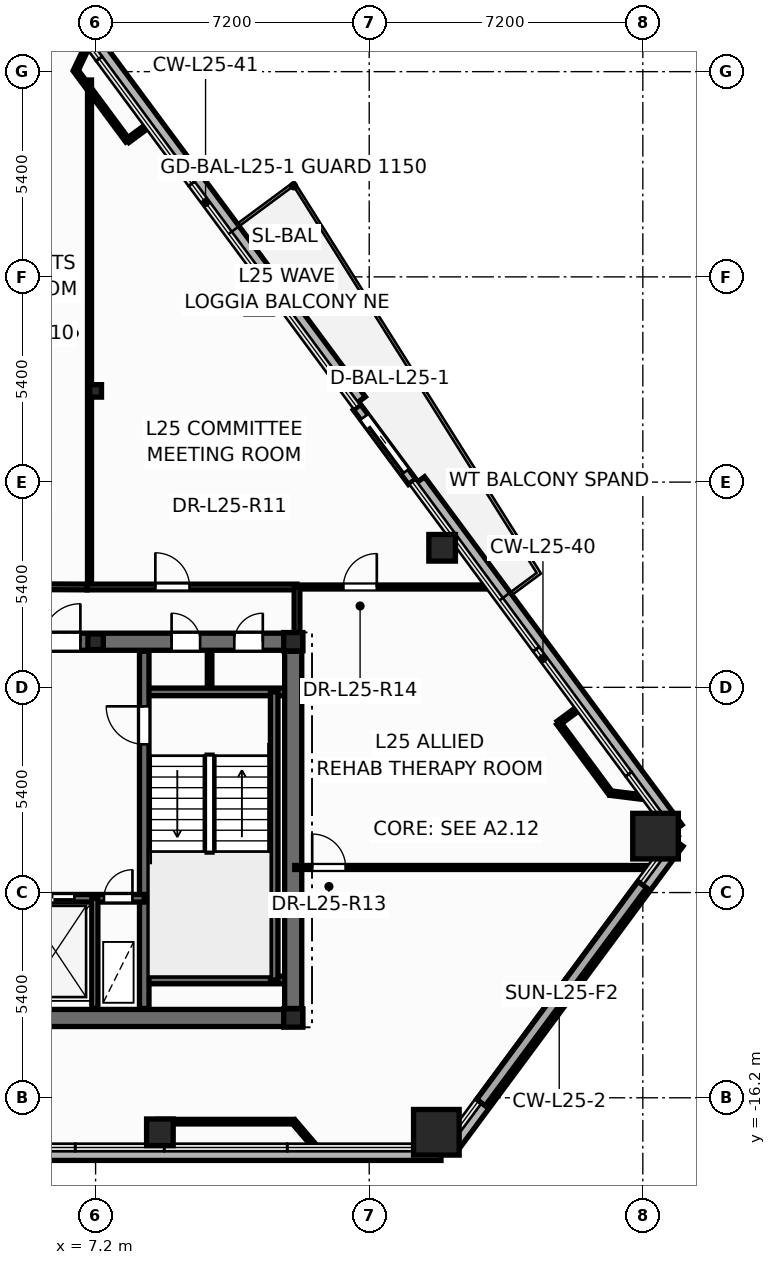
"""IFC4 building model, lengths in metres.
Left out: names, types, materials, properties, quantities, classifications, styles, units other than length and angle.
Written with IfcOpenShell. Run it as: python <this file> out.ifc"""

import sys

from ifc_helpers import new_model, si_unit, direction, frame, frame_2d, origin, origin_2d, place, context, subcontext, project, spatial, rectangle, hollow_rectangle, hollow_circle, i_section, extrude, element, fill, save


model = new_model("IFC4")
c1 = context("Model", 3, precision=1e-05, world=origin(), true_north=direction((0.0, 1.0)))
c2 = subcontext(c1, "Body", "Model", "MODEL_VIEW")
j1 = project(units=[si_unit("LENGTHUNIT", "METRE"), si_unit("PLANEANGLEUNIT", "RADIAN")], contexts=[c1])
p1 = place(None, origin())
s1 = spatial("IfcSite", under=j1, at=p1, CompositionType="ELEMENT")
p2 = place(p1, origin())
s2 = spatial("IfcBuilding", under=s1, at=p2, CompositionType="ELEMENT")
p3 = place(p2, frame((0.0, 0.0, 99.6)))
s3 = spatial("IfcBuildingStorey", under=s2, at=p3, CompositionType="ELEMENT", Elevation=99.6)
for number, where, z_axis, x_axis in (
    (1, (16.167, -17.108, 0.0), (0.0, 0.0, 1.0), (1.0, 0.0, 0.0)),
    (2, (21.934, -9.316, 0.0), (0.0, 0.0, 1.0), (1.0, 0.0, 0.0)),
):
    element("IfcColumn", number, at=place(p3, frame(where, z_axis=z_axis, x_axis=x_axis)), inside=s3, PredefinedType="COLUMN", context=c2, shape_type="SweptSolid", body=[
        extrude(hollow_rectangle(XDim=1.2, YDim=1.2, WallThickness=0.055, at=origin_2d()), origin(), (0.0, 0.0, 1.0), 3.6),
    ])
for number, where, z_axis, x_axis in (
    (3, (8.892, -17.108, 0.0), (0.0, 0.0, 1.0), (1.0, 0.0, 0.0)),
    (4, (16.319, -1.729, 0.0), (0.0, 0.0, 1.0), (1.0, 0.0, 0.0)),
    (5, (11.506, 4.775, 0.0), (0.0, 0.0, 1.0), (1.0, 0.0, 0.0)),
):
    element("IfcColumn", number, at=place(p3, frame(where, z_axis=z_axis, x_axis=x_axis)), inside=s3, PredefinedType="COLUMN", context=c2, shape_type="SweptSolid", body=[
        extrude(hollow_circle(Radius=0.35, WallThickness=0.03, at=origin_2d()), origin(), (0.0, 0.0, 1.0), 3.6),
    ])
for number, where, z_axis, x_axis in (
    (6, (12.4, -14.1, 0.0), (0.0, 0.0, 1.0), (1.0, 0.0, 0.0)),
    (7, (12.4, -4.2, 0.0), (0.0, 0.0, 1.0), (1.0, 0.0, 0.0)),
):
    element("IfcColumn", number, at=place(p3, frame(where, z_axis=z_axis, x_axis=x_axis)), inside=s3, PredefinedType="COLUMN", context=c2, shape_type="SweptSolid", body=[
        extrude(i_section(OverallWidth=0.5, OverallDepth=0.482, WebThickness=0.04, FlangeThickness=0.045, at=origin_2d()), origin(), (0.0, 0.0, 1.0), 3.6),
    ])
p4 = place(p3, frame((7.2, -4.2, 0.0), z_axis=(0.0, 0.0, 1.0), x_axis=(1.0, 0.0, 0.0)))
e8 = element("IfcColumn", 8, at=p4, inside=s3, PredefinedType="PILASTER", context=c2, shape_type="SweptSolid", body=[
    extrude(i_section(OverallWidth=0.405, OverallDepth=0.414, WebThickness=0.022, FlangeThickness=0.032, at=origin_2d()), origin(), (0.0, 0.0, 1.0), 3.6),
])
p5 = place(p3, frame((7.2, 2.4, 0.0), z_axis=(0.0, 0.0, 1.0), x_axis=(1.0, 0.0, 0.0)))
e9 = element("IfcColumn", 9, at=p5, inside=s3, PredefinedType="COLUMN", context=c2, shape_type="SweptSolid", body=[
    extrude(i_section(OverallWidth=0.311, OverallDepth=0.327, WebThickness=0.016, FlangeThickness=0.025, at=origin_2d()), origin(), (0.0, 0.0, 1.0), 3.6),
])
p6 = place(p3, frame((-16.289, -17.668, -0.2), z_axis=(0.0, 0.0, 1.0), x_axis=(1.0, 0.0, 0.0)))
e10 = element("IfcWall", 10, at=p6, inside=s3, PredefinedType="PARAPET", context=c2, shape_type="SweptSolid", body=[
    extrude(rectangle(XDim=32.577, YDim=0.36, at=frame_2d((16.289, 0.0))), origin(), (0.0, 0.0, 1.0), 0.38),
])
p7 = place(p3, frame((16.545, -17.539, -0.2), z_axis=(0.0, 0.0, 1.0), x_axis=(0.594898670943, 0.803800703726, 0.0)))
e11 = element("IfcWall", 11, at=p7, inside=s3, PredefinedType="PARAPET", context=c2, shape_type="SweptSolid", body=[
    extrude(rectangle(XDim=10.032, YDim=0.36, at=frame_2d((5.016, 0.0))), origin(), (0.0, 0.0, 1.0), 0.38),
])
p8 = place(p3, frame((22.489, -9.124, -0.2), z_axis=(0.0, 0.0, 1.0), x_axis=(-0.59490615029, 0.803795168154, 0.0)))
e12 = element("IfcWall", 12, at=p8, inside=s3, PredefinedType="PARAPET", context=c2, shape_type="SweptSolid", body=[
    extrude(rectangle(XDim=11.392, YDim=0.36, at=frame_2d((5.696, 0.0))), origin(), (0.0, 0.0, 1.0), 0.38),
])
p9 = place(p3, frame((14.153, 2.139, -0.2), z_axis=(0.0, 0.0, 1.0), x_axis=(-0.594915583051, 0.803788186678, 0.0)))
e13 = element("IfcWall", 13, at=p9, inside=s3, PredefinedType="PARAPET", context=c2, shape_type="SweptSolid", body=[
    extrude(rectangle(XDim=13.215, YDim=0.36, at=frame_2d((6.607, 0.0))), origin(), (0.0, 0.0, 1.0), 0.38),
])
p10 = place(p3, frame((15.53, 0.01, -0.015), z_axis=(0.0, 0.0, 1.0), x_axis=(-0.594897308784, 0.803801711868, 0.0)))
e14 = element("IfcWall", 14, at=p10, inside=s3, PredefinedType="STANDARD", context=c2, shape_type="SweptSolid", body=[
    extrude(rectangle(XDim=2.44, YDim=0.24, at=frame_2d((1.22, 0.0))), origin(), (0.0, 0.0, 1.0), 2.729),
])
p11 = place(p10, frame((0.32, 0.0, 0.015)))
e15 = element("IfcOpeningElement", 15, at=p11, cuts=e14, PredefinedType="OPENING", context=c2, shape_type="SweptSolid", body=[
    extrude(rectangle(XDim=1.806, YDim=2.204, at=frame_2d((0.9, 1.102))), frame((0.0, 0.13, 0.0), z_axis=(0.0, -1.0, 0.0), x_axis=(1.0, 0.0, 0.0)), (0.0, 0.0, 1.0), 0.26),
])
p12 = place(p3, frame((10.2, -5.52, 0.0), z_axis=(0.0, 0.0, 1.0), x_axis=(0.0, 1.0, 0.0)))
e16 = element("IfcWall", 16, at=p12, inside=s3, PredefinedType="PARTITIONING", context=c2, shape_type="SweptSolid", body=[
    extrude(rectangle(XDim=1.12, YDim=0.12, at=frame_2d((0.56, 0.0))), origin(), (0.0, 0.0, 1.0), 3.35),
])
p13 = place(p3, frame((-12.65, -14.1, 0.0), z_axis=(0.0, 0.0, 1.0), x_axis=(1.0, 0.0, 0.0)))
e17 = element("IfcWall", 17, at=p13, inside=s3, PredefinedType="SHEAR", context=c2, shape_type="SweptSolid", body=[
    extrude(rectangle(XDim=25.3, YDim=0.45, at=frame_2d((12.65, 0.0))), origin(), (0.0, 0.0, 1.0), 3.6),
])
p14 = place(p3, frame((-12.65, -4.2, 0.0), z_axis=(0.0, 0.0, 1.0), x_axis=(1.0, 0.0, 0.0)))
e18 = element("IfcWall", 18, at=p14, inside=s3, PredefinedType="SHEAR", context=c2, shape_type="SweptSolid", body=[
    extrude(rectangle(XDim=25.3, YDim=0.45, at=frame_2d((12.65, 0.0))), origin(), (0.0, 0.0, 1.0), 3.6),
])
p15 = place(p14, frame((1.85, 0.0, 0.0)))
e19 = element("IfcOpeningElement", 19, at=p15, cuts=e18, PredefinedType="OPENING", context=c2, shape_type="SweptSolid", body=[
    extrude(rectangle(XDim=0.756, YDim=2.054, at=frame_2d((0.375, 1.027))), frame((0.0, 0.235, 0.0), z_axis=(0.0, -1.0, 0.0), x_axis=(1.0, 0.0, 0.0)), (0.0, 0.0, 1.0), 0.47),
])
p16 = place(p14, frame((21.85, 0.0, 0.0)))
e20 = element("IfcOpeningElement", 20, at=p16, cuts=e18, PredefinedType="OPENING", context=c2, shape_type="SweptSolid", body=[
    extrude(rectangle(XDim=0.756, YDim=2.054, at=frame_2d((0.375, 1.027))), frame((0.0, 0.235, 0.0), z_axis=(0.0, -1.0, 0.0), x_axis=(1.0, 0.0, 0.0)), (0.0, 0.0, 1.0), 0.47),
])
p17 = place(p14, frame((23.5, 0.0, 0.0)))
e21 = element("IfcOpeningElement", 21, at=p17, cuts=e18, PredefinedType="OPENING", context=c2, shape_type="SweptSolid", body=[
    extrude(rectangle(XDim=0.756, YDim=2.054, at=frame_2d((0.375, 1.027))), frame((0.0, 0.235, 0.0), z_axis=(0.0, -1.0, 0.0), x_axis=(1.0, 0.0, 0.0)), (0.0, 0.0, 1.0), 0.47),
])
p18 = place(p14, frame((5.85, 0.0, 0.0)))
e22 = element("IfcOpeningElement", 22, at=p18, cuts=e18, PredefinedType="OPENING", context=c2, shape_type="SweptSolid", body=[
    extrude(rectangle(XDim=1.006, YDim=2.104, at=frame_2d((0.5, 1.052))), frame((0.0, 0.235, 0.0), z_axis=(0.0, -1.0, 0.0), x_axis=(1.0, 0.0, 0.0)), (0.0, 0.0, 1.0), 0.47),
])
p19 = place(p14, frame((10.35, 0.0, 0.0)))
e23 = element("IfcOpeningElement", 23, at=p19, cuts=e18, PredefinedType="OPENING", context=c2, shape_type="SweptSolid", body=[
    extrude(rectangle(XDim=1.406, YDim=2.154, at=frame_2d((0.7, 1.077))), frame((0.0, 0.235, 0.0), z_axis=(0.0, -1.0, 0.0), x_axis=(1.0, 0.0, 0.0)), (0.0, 0.0, 1.0), 0.47),
])
p20 = place(p14, frame((18.45, 0.0, 0.0)))
e24 = element("IfcOpeningElement", 24, at=p20, cuts=e18, PredefinedType="OPENING", context=c2, shape_type="SweptSolid", body=[
    extrude(rectangle(XDim=1.006, YDim=2.104, at=frame_2d((0.5, 1.052))), frame((0.0, 0.235, 0.0), z_axis=(0.0, -1.0, 0.0), x_axis=(1.0, 0.0, 0.0)), (0.0, 0.0, 1.0), 0.47),
])
for number, where, z_axis, x_axis in (
    (25, (8.48, -5.52, 0.0), (0.0, 0.0, 1.0), (1.0, 0.0, 0.0)),
    (26, (8.48, -13.1, 0.0), (0.0, 0.0, 1.0), (1.0, 0.0, 0.0)),
):
    element("IfcWall", number, at=place(p3, frame(where, z_axis=z_axis, x_axis=x_axis)), inside=s3, PredefinedType="SOLIDWALL", context=c2, shape_type="SweptSolid", body=[
        extrude(rectangle(XDim=3.87, YDim=0.2, at=frame_2d((1.935, 0.0))), origin(), (0.0, 0.0, 1.0), 3.6),
    ])
p21 = place(p3, frame((11.9, -13.1, 0.0), z_axis=(0.0, 0.0, 1.0), x_axis=(0.0, 1.0, 0.0)))
e27 = element("IfcWall", 27, at=p21, inside=s3, PredefinedType="SOLIDWALL", context=c2, shape_type="SweptSolid", body=[
    extrude(rectangle(XDim=7.58, YDim=0.2, at=frame_2d((3.79, 0.0))), origin(), (0.0, 0.0, 1.0), 3.6),
])
p22 = place(p3, frame((8.48, -13.85, 0.0), z_axis=(0.0, 0.0, 1.0), x_axis=(0.0, 1.0, 0.0)))
e28 = element("IfcWall", 28, at=p22, inside=s3, PredefinedType="SHEAR", context=c2, shape_type="SweptSolid", body=[
    extrude(rectangle(XDim=9.4, YDim=0.25, at=frame_2d((4.7, 0.0))), origin(), (0.0, 0.0, 1.0), 3.6),
])
p23 = place(p22, frame((6.95, 0.0, 0.0)))
e29 = element("IfcOpeningElement", 29, at=p23, cuts=e28, PredefinedType="OPENING", context=c2, shape_type="SweptSolid", body=[
    extrude(rectangle(XDim=1.006, YDim=2.104, at=frame_2d((0.5, 1.052))), frame((0.0, 0.135, 0.0), z_axis=(0.0, -1.0, 0.0), x_axis=(1.0, 0.0, 0.0)), (0.0, 0.0, 1.0), 0.27),
])
p24 = place(p3, frame((5.12, -10.95, 0.0), z_axis=(0.0, 0.0, 1.0), x_axis=(1.0, 0.0, 0.0)))
e30 = element("IfcWall", 30, at=p24, inside=s3, PredefinedType="SOLIDWALL", context=c2, shape_type="SweptSolid", body=[
    extrude(rectangle(XDim=3.36, YDim=0.2, at=frame_2d((1.68, 0.0))), origin(), (0.0, 0.0, 1.0), 3.6),
])
p25 = place(p24, frame((0.42, 0.0, 0.0)))
e31 = element("IfcOpeningElement", 31, at=p25, cuts=e30, PredefinedType="OPENING", context=c2, shape_type="SweptSolid", body=[
    extrude(rectangle(XDim=1.106, YDim=2.104, at=frame_2d((0.55, 1.052))), frame((0.0, 0.11, 0.0), z_axis=(0.0, -1.0, 0.0), x_axis=(1.0, 0.0, 0.0)), (0.0, 0.0, 1.0), 0.22),
])
p26 = place(p24, frame((2.3, 0.0, 0.0)))
e32 = element("IfcOpeningElement", 32, at=p26, cuts=e30, PredefinedType="OPENING", context=c2, shape_type="SweptSolid", body=[
    extrude(rectangle(XDim=0.756, YDim=2.054, at=frame_2d((0.375, 1.027))), frame((0.0, 0.11, 0.0), z_axis=(0.0, -1.0, 0.0), x_axis=(1.0, 0.0, 0.0)), (0.0, 0.0, 1.0), 0.22),
])
p27 = place(p3, frame((7.18, -13.85, 0.0), z_axis=(0.0, 0.0, 1.0), x_axis=(0.0, 1.0, 0.0)))
e33 = element("IfcWall", 33, at=p27, inside=s3, PredefinedType="PARTITIONING", context=c2, shape_type="SweptSolid", body=[
    extrude(rectangle(XDim=2.9, YDim=0.16, at=frame_2d((1.45, 0.0))), origin(), (0.0, 0.0, 1.0), 2.375),
])
p28 = place(p3, frame((12.4, -13.85, 0.0), z_axis=(0.0, 0.0, 1.0), x_axis=(0.0, 1.0, 0.0)))
e34 = element("IfcWall", 34, at=p28, inside=s3, PredefinedType="SHEAR", context=c2, shape_type="SweptSolid", body=[
    extrude(rectangle(XDim=9.4, YDim=0.45, at=frame_2d((4.7, 0.0))), origin(), (0.0, 0.0, 1.0), 3.6),
])
p29 = place(p3, frame((7.04, -2.76, 0.0), z_axis=(0.0, 0.0, 1.0), x_axis=(0.0, 1.0, 0.0)))
e35 = element("IfcWall", 35, at=p29, inside=s3, PredefinedType="PARTITIONING", context=c2, shape_type="SweptSolid", body=[
    extrude(rectangle(XDim=13.34, YDim=0.105, at=frame_2d((6.67, 0.0))), origin(), (0.0, 0.0, 1.0), 2.325),
])
p30 = place(p3, frame((12.44, -10.14, 0.0), z_axis=(0.0, 0.0, 1.0), x_axis=(1.0, 0.0, 0.0)))
e36 = element("IfcWall", 36, at=p30, inside=s3, PredefinedType="PARTITIONING", context=c2, shape_type="SweptSolid", body=[
    extrude(rectangle(XDim=9.382, YDim=0.105, at=frame_2d((4.691, 0.0))), origin(), (0.0, 0.0, 1.0), 2.713),
])
p31 = place(p30, frame((0.46, 0.0, 0.0)))
e37 = element("IfcOpeningElement", 37, at=p31, cuts=e36, PredefinedType="OPENING", context=c2, shape_type="SweptSolid", body=[
    extrude(rectangle(XDim=0.886, YDim=2.104, at=frame_2d((0.44, 1.052))), frame((0.0, 0.062, 0.0), z_axis=(0.0, -1.0, 0.0), x_axis=(1.0, 0.0, 0.0)), (0.0, 0.0, 1.0), 0.125),
])
p32 = place(p3, frame((6.98, -2.76, 0.0), z_axis=(0.0, 0.0, 1.0), x_axis=(1.0, 0.0, 0.0)))
e38 = element("IfcWall", 38, at=p32, inside=s3, PredefinedType="PARTITIONING", context=c2, shape_type="SweptSolid", body=[
    extrude(rectangle(XDim=5.52, YDim=0.15, at=frame_2d((2.76, 0.0))), origin(), (0.0, 0.0, 1.0), 2.325),
])
p33 = place(p32, frame((1.792, 0.0, 0.0)))
e39 = element("IfcOpeningElement", 39, at=p33, cuts=e38, PredefinedType="OPENING", context=c2, shape_type="SweptSolid", body=[
    extrude(rectangle(XDim=0.906, YDim=2.104, at=frame_2d((0.45, 1.052))), frame((0.0, 0.085, 0.0), z_axis=(0.0, -1.0, 0.0), x_axis=(1.0, 0.0, 0.0)), (0.0, 0.0, 1.0), 0.17),
])
p34 = place(p3, frame((12.44, -2.76, 0.0), z_axis=(0.0, 0.0, 1.0), x_axis=(1.0, 0.0, 0.0)))
e40 = element("IfcWall", 40, at=p34, inside=s3, PredefinedType="PARTITIONING", context=c2, shape_type="SweptSolid", body=[
    extrude(rectangle(XDim=5.14, YDim=0.105, at=frame_2d((2.57, 0.0))), origin(), (0.0, 0.0, 1.0), 2.713),
])
p35 = place(p34, frame((1.28, 0.0, 0.0)))
e41 = element("IfcOpeningElement", 41, at=p35, cuts=e40, PredefinedType="OPENING", context=c2, shape_type="SweptSolid", body=[
    extrude(rectangle(XDim=0.886, YDim=2.104, at=frame_2d((0.44, 1.052))), frame((0.0, 0.062, 0.0), z_axis=(0.0, -1.0, 0.0), x_axis=(1.0, 0.0, 0.0)), (0.0, 0.0, 1.0), 0.125),
])
p36 = place(p3, frame((2.36, -2.74, 0.0), z_axis=(0.0, 0.0, 1.0), x_axis=(0.999991056007, -0.0042294097, 0.0)))
e42 = element("IfcWall", 42, at=p36, inside=s3, PredefinedType="PARTITIONING", context=c2, shape_type="SweptSolid", body=[
    extrude(rectangle(XDim=4.618, YDim=0.15, at=frame_2d((2.309, 0.0))), origin(), (0.0, 0.0, 1.0), 2.918),
])
p37 = place(p3, frame((8.842, -16.828, 0.0), z_axis=(0.0, 0.0, 1.0), x_axis=(1.0, 0.0, 0.0)))
e43 = element("IfcWall", 43, at=p37, inside=s3, PredefinedType="PARTITIONING", context=c2, shape_type="SweptSolid", body=[
    extrude(rectangle(XDim=3.569, YDim=0.12, at=frame_2d((1.784, 0.0))), origin(), (0.0, 0.0, 1.0), 2.713),
])
p38 = place(p3, frame((8.042, 8.984, 0.0), z_axis=(0.0, 0.0, 1.0), x_axis=(-0.594914508596, 0.803788981924, 0.0)))
e44 = element("IfcWall", 44, at=p38, inside=s3, PredefinedType="PARTITIONING", context=c2, shape_type="SweptSolid", body=[
    extrude(rectangle(XDim=2.294, YDim=0.12, at=frame_2d((1.147, 0.0))), origin(), (0.0, 0.0, 1.0), 3.35),
])
p39 = place(p3, frame((20.748, -8.183, 0.0), z_axis=(0.0, 0.0, 1.0), x_axis=(-0.594863630048, 0.803826636561, 0.0)))
e45 = element("IfcWall", 45, at=p39, inside=s3, PredefinedType="PARTITIONING", context=c2, shape_type="SweptSolid", body=[
    extrude(rectangle(XDim=2.295, YDim=0.12, at=frame_2d((1.147, 0.0))), origin(), (0.0, 0.0, 1.0), 3.35),
])
p40 = place(p3, frame((12.5, -4.24, 0.0), z_axis=(0.0, 0.0, 1.0), x_axis=(0.0, 1.0, 0.0)))
e46 = element("IfcWall", 46, at=p40, inside=s3, PredefinedType="PARTITIONING", context=c2, shape_type="SweptSolid", body=[
    extrude(rectangle(XDim=1.48, YDim=0.15, at=frame_2d((0.74, 0.0))), origin(), (0.0, 0.0, 1.0), 2.325),
])
p41 = place(p3, frame((12.411, -16.828, 0.0), z_axis=(0.0, 0.0, 1.0), x_axis=(0.649031566587, -0.760761477451, 0.0)))
e47 = element("IfcWall", 47, at=p41, inside=s3, PredefinedType="PARTITIONING", context=c2, shape_type="SweptSolid", body=[
    extrude(rectangle(XDim=0.881, YDim=0.12, at=frame_2d((0.44, 0.0))), origin(), (0.0, 0.0, 1.0), 2.713),
])
p42 = place(p3, frame((21.59, -8.289, 0.0), z_axis=(0.0, 0.0, 1.0), x_axis=(-0.992286724014, 0.123963935667, 0.0)))
e48 = element("IfcWall", 48, at=p42, inside=s3, PredefinedType="PARTITIONING", context=c2, shape_type="SweptSolid", body=[
    extrude(rectangle(XDim=0.849, YDim=0.12, at=frame_2d((0.424, 0.0))), origin(), (0.0, 0.0, 1.0), 2.713),
])
p43 = place(p3, frame((6.677, 10.828, 0.0), z_axis=(0.0, 0.0, 1.0), x_axis=(0.429247003256, 0.903187140185, 0.0)))
e49 = element("IfcWall", 49, at=p43, inside=s3, PredefinedType="PARTITIONING", context=c2, shape_type="SweptSolid", body=[
    extrude(rectangle(XDim=0.759, YDim=0.12, at=frame_2d((0.38, 0.0))), origin(), (0.0, 0.0, 1.0), 2.713),
])
p44 = place(p3, frame((19.383, -6.339, 0.0), z_axis=(0.0, 0.0, 1.0), x_axis=(0.803744328022, 0.594974835748, 0.0)))
e50 = element("IfcWall", 50, at=p44, inside=s3, PredefinedType="PARTITIONING", context=c2, shape_type="SweptSolid", body=[
    extrude(rectangle(XDim=0.67, YDim=0.12, at=frame_2d((0.335, 0.0))), origin(), (0.0, 0.0, 1.0), 2.713),
])
for number, where, z_axis, x_axis in (
    (51, (8.842, -17.498, 0.0), (0.0, 0.0, 1.0), (0.0, 1.0, 0.0)),
    (52, (8.58, 9.383, 0.0), (0.0, 0.0, 1.0), (-0.804, -0.595, 0.0)),
):
    element("IfcWall", number, at=place(p3, frame(where, z_axis=z_axis, x_axis=x_axis)), inside=s3, PredefinedType="PARTITIONING", context=c2, shape_type="SweptSolid", body=[
        extrude(rectangle(XDim=0.67, YDim=0.12, at=frame_2d((0.335, 0.0))), origin(), (0.0, 0.0, 1.0), 2.713),
    ])
p45 = place(p11, origin())
e53 = element("IfcDoor", 53, at=p45, inside=s3, OperationType="SLIDING_TO_LEFT", PredefinedType="DOOR", context=c2, shape_type="SweptSolid", body=[
    extrude(rectangle(XDim=1.8, YDim=2.2, at=frame_2d((0.9, 1.1))), frame((0.0, 0.025, 0.0), z_axis=(0.0, -1.0, 0.0), x_axis=(1.0, 0.0, 0.0)), (0.0, 0.0, 1.0), 0.05),
])
fill(e15, e53)
p46 = place(p23, origin())
e54 = element("IfcDoor", 54, at=p46, inside=s3, OperationType="SINGLE_SWING_RIGHT", PredefinedType="DOOR", context=c2, shape_type="SweptSolid", body=[
    extrude(rectangle(XDim=1.0, YDim=2.1, at=frame_2d((0.5, 1.05))), frame((0.0, 0.025, 0.0), z_axis=(0.0, -1.0, 0.0), x_axis=(1.0, 0.0, 0.0)), (0.0, 0.0, 1.0), 0.05),
])
fill(e29, e54)
p47 = place(p25, origin())
e55 = element("IfcDoor", 55, at=p47, inside=s3, OperationType="DOUBLE_DOOR_SLIDING", PredefinedType="DOOR", context=c2, shape_type="SweptSolid", body=[
    extrude(rectangle(XDim=1.1, YDim=2.1, at=frame_2d((0.55, 1.05))), frame((0.0, 0.025, 0.0), z_axis=(0.0, -1.0, 0.0), x_axis=(1.0, 0.0, 0.0)), (0.0, 0.0, 1.0), 0.05),
])
fill(e31, e55)
p48 = place(p26, origin())
e56 = element("IfcDoor", 56, at=p48, inside=s3, OperationType="SINGLE_SWING_RIGHT", PredefinedType="DOOR", context=c2, shape_type="SweptSolid", body=[
    extrude(rectangle(XDim=0.75, YDim=2.05, at=frame_2d((0.375, 1.025))), frame((0.0, 0.025, 0.0), z_axis=(0.0, -1.0, 0.0), x_axis=(1.0, 0.0, 0.0)), (0.0, 0.0, 1.0), 0.05),
])
fill(e32, e56)
p49 = place(p16, origin())
e57 = element("IfcDoor", 57, at=p49, inside=s3, OperationType="SINGLE_SWING_LEFT", PredefinedType="DOOR", context=c2, shape_type="SweptSolid", body=[
    extrude(rectangle(XDim=0.75, YDim=2.05, at=frame_2d((0.375, 1.025))), frame((0.0, 0.025, 0.0), z_axis=(0.0, -1.0, 0.0), x_axis=(1.0, 0.0, 0.0)), (0.0, 0.0, 1.0), 0.05),
])
fill(e20, e57)
p50 = place(p17, origin())
e58 = element("IfcDoor", 58, at=p50, inside=s3, OperationType="SINGLE_SWING_RIGHT", PredefinedType="DOOR", context=c2, shape_type="SweptSolid", body=[
    extrude(rectangle(XDim=0.75, YDim=2.05, at=frame_2d((0.375, 1.025))), frame((0.0, 0.025, 0.0), z_axis=(0.0, -1.0, 0.0), x_axis=(1.0, 0.0, 0.0)), (0.0, 0.0, 1.0), 0.05),
])
fill(e21, e58)
p51 = place(p20, origin())
e59 = element("IfcDoor", 59, at=p51, inside=s3, OperationType="SINGLE_SWING_RIGHT", PredefinedType="DOOR", context=c2, shape_type="SweptSolid", body=[
    extrude(rectangle(XDim=1.0, YDim=2.1, at=frame_2d((0.5, 1.05))), frame((0.0, 0.025, 0.0), z_axis=(0.0, -1.0, 0.0), x_axis=(1.0, 0.0, 0.0)), (0.0, 0.0, 1.0), 0.05),
])
fill(e24, e59)
p52 = place(p33, origin())
e60 = element("IfcDoor", 60, at=p52, inside=s3, OperationType="SINGLE_SWING_LEFT", PredefinedType="DOOR", context=c2, shape_type="SweptSolid", body=[
    extrude(rectangle(XDim=0.9, YDim=2.1, at=frame_2d((0.45, 1.05))), frame((0.0, 0.025, 0.0), z_axis=(0.0, -1.0, 0.0), x_axis=(1.0, 0.0, 0.0)), (0.0, 0.0, 1.0), 0.05),
])
fill(e39, e60)
p53 = place(p31, origin())
e61 = element("IfcDoor", 61, at=p53, inside=s3, OperationType="SINGLE_SWING_LEFT", PredefinedType="DOOR", context=c2, shape_type="SweptSolid", body=[
    extrude(rectangle(XDim=0.88, YDim=2.1, at=frame_2d((0.44, 1.05))), frame((0.0, 0.025, 0.0), z_axis=(0.0, -1.0, 0.0), x_axis=(1.0, 0.0, 0.0)), (0.0, 0.0, 1.0), 0.05),
])
fill(e37, e61)
p54 = place(p35, origin())
e62 = element("IfcDoor", 62, at=p54, inside=s3, OperationType="SINGLE_SWING_RIGHT", PredefinedType="DOOR", context=c2, shape_type="SweptSolid", body=[
    extrude(rectangle(XDim=0.88, YDim=2.1, at=frame_2d((0.44, 1.05))), frame((0.0, 0.025, 0.0), z_axis=(0.0, -1.0, 0.0), x_axis=(1.0, 0.0, 0.0)), (0.0, 0.0, 1.0), 0.05),
])
fill(e41, e62)
save(model, sys.argv[1])
